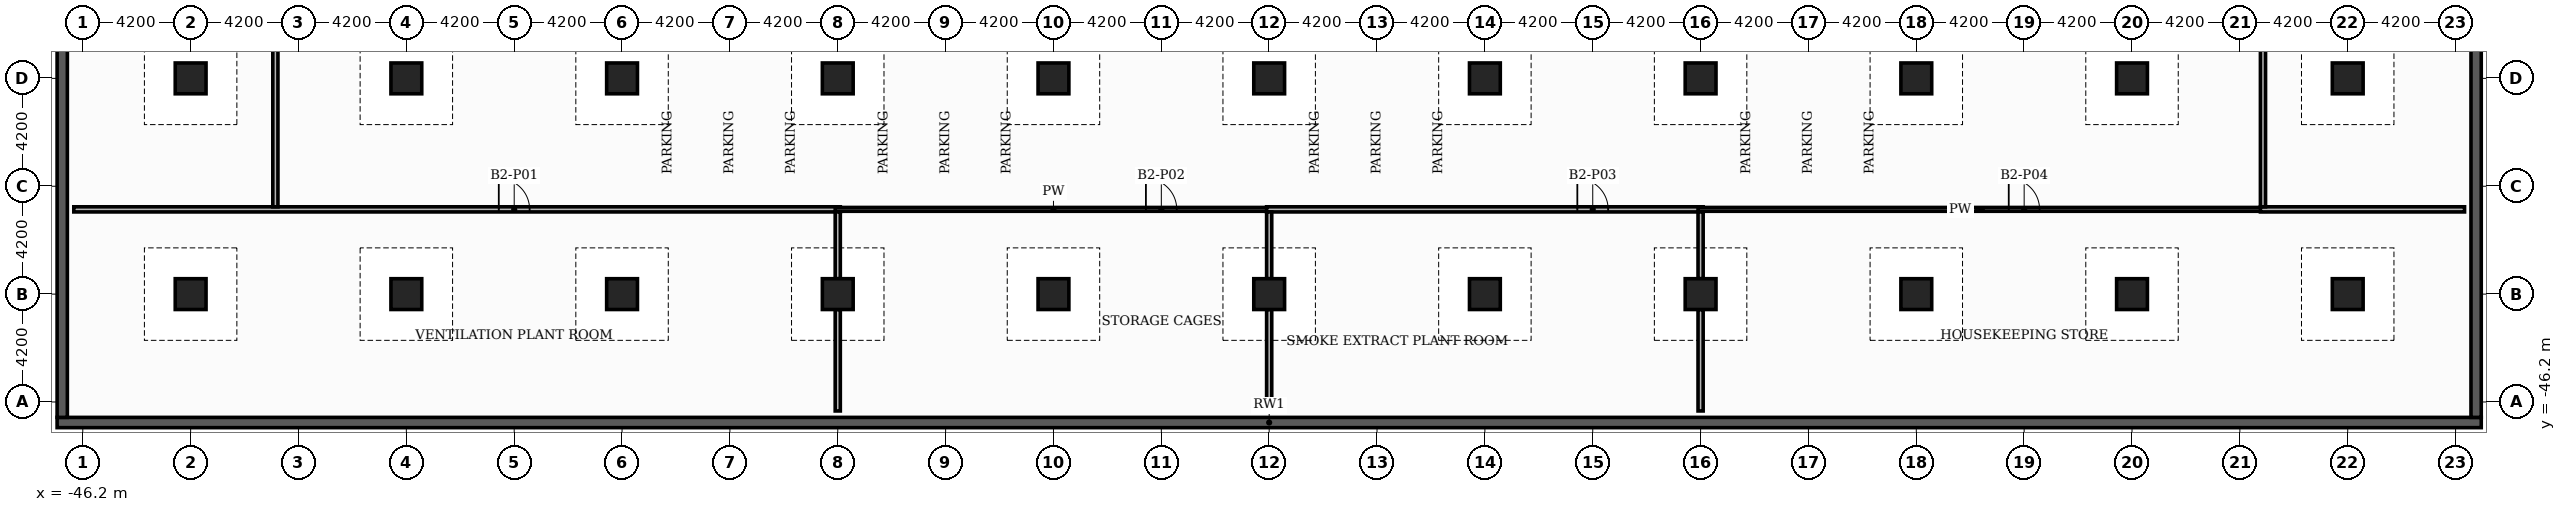
"""IFC4 building model, lengths in metres.
Left out: names, types, materials, properties, quantities, classifications, styles, units other than length and angle.
Written with IfcOpenShell. Run it as: python <this file> out.ifc"""

import sys

from ifc_helpers import new_model, si_unit, direction, frame, frame_2d, origin, origin_2d, place, context, subcontext, project, spatial, rectangle, extrude, element, fill, save


model = new_model("IFC4")
c1 = context("Model", 3, precision=1e-05, world=origin(), true_north=direction((0.0, 1.0)))
c2 = subcontext(c1, "Body", "Model", "MODEL_VIEW")
j1 = project(units=[si_unit("LENGTHUNIT", "METRE"), si_unit("PLANEANGLEUNIT", "RADIAN")], contexts=[c1])
p1 = place(None, origin())
s1 = spatial("IfcSite", under=j1, at=p1, CompositionType="ELEMENT")
p2 = place(p1, origin())
s2 = spatial("IfcBuilding", under=s1, at=p2, CompositionType="ELEMENT")
p3 = place(p2, frame((0.0, 0.0, -8.4)))
s3 = spatial("IfcBuildingStorey", under=s2, at=p3, CompositionType="ELEMENT", Elevation=-8.4)
p4 = place(p3, frame((-47.2, -47.0, -0.4), z_axis=(0.0, 0.0, 1.0), x_axis=(1.0, 0.0, 0.0)))
e1 = element("IfcWall", 1, at=p4, inside=s3, PredefinedType="USERDEFINED", context=c2, shape_type="SweptSolid", body=[
    extrude(rectangle(XDim=94.4, YDim=0.4, at=frame_2d((47.2, 0.0))), origin(), (0.0, 0.0, 1.0), 4.6),
])
for number, where, z_axis, x_axis in (
    (2, (-47.0, -46.8, -0.4), (0.0, 0.0, 1.0), (0.0, 1.0, 0.0)),
    (3, (47.0, -46.8, -0.4), (0.0, 0.0, 1.0), (0.0, 1.0, 0.0)),
):
    element("IfcWall", number, at=place(p3, frame(where, z_axis=z_axis, x_axis=x_axis)), inside=s3, PredefinedType="USERDEFINED", context=c2, shape_type="SweptSolid", body=[
        extrude(rectangle(XDim=93.6, YDim=0.4, at=frame_2d((46.8, 0.0))), origin(), (0.0, 0.0, 1.0), 4.6),
    ])
for number, where, z_axis, x_axis in (
    (4, (0.0, -33.6, 0.0), (0.0, 0.0, 1.0), (1.0, 0.0, 0.0)),
    (5, (0.0, -42.0, 0.0), (0.0, 0.0, 1.0), (1.0, 0.0, 0.0)),
    (6, (8.4, -33.6, 0.0), (0.0, 0.0, 1.0), (1.0, 0.0, 0.0)),
    (7, (8.4, -42.0, 0.0), (0.0, 0.0, 1.0), (1.0, 0.0, 0.0)),
    (8, (16.8, -33.6, 0.0), (0.0, 0.0, 1.0), (1.0, 0.0, 0.0)),
    (9, (16.8, -42.0, 0.0), (0.0, 0.0, 1.0), (1.0, 0.0, 0.0)),
    (10, (25.2, -33.6, 0.0), (0.0, 0.0, 1.0), (1.0, 0.0, 0.0)),
    (11, (25.2, -42.0, 0.0), (0.0, 0.0, 1.0), (1.0, 0.0, 0.0)),
    (12, (33.6, -33.6, 0.0), (0.0, 0.0, 1.0), (1.0, 0.0, 0.0)),
    (13, (33.6, -42.0, 0.0), (0.0, 0.0, 1.0), (1.0, 0.0, 0.0)),
    (14, (42.0, -33.6, 0.0), (0.0, 0.0, 1.0), (1.0, 0.0, 0.0)),
    (15, (42.0, -42.0, 0.0), (0.0, 0.0, 1.0), (1.0, 0.0, 0.0)),
    (16, (-8.4, -33.6, 0.0), (0.0, 0.0, 1.0), (1.0, 0.0, 0.0)),
    (17, (-8.4, -42.0, 0.0), (0.0, 0.0, 1.0), (1.0, 0.0, 0.0)),
    (18, (-16.8, -33.6, 0.0), (0.0, 0.0, 1.0), (1.0, 0.0, 0.0)),
    (19, (-16.8, -42.0, 0.0), (0.0, 0.0, 1.0), (1.0, 0.0, 0.0)),
    (20, (-25.2, -33.6, 0.0), (0.0, 0.0, 1.0), (1.0, 0.0, 0.0)),
    (21, (-25.2, -42.0, 0.0), (0.0, 0.0, 1.0), (1.0, 0.0, 0.0)),
    (22, (-33.6, -33.6, 0.0), (0.0, 0.0, 1.0), (1.0, 0.0, 0.0)),
    (23, (-33.6, -42.0, 0.0), (0.0, 0.0, 1.0), (1.0, 0.0, 0.0)),
    (24, (-42.0, -33.6, 0.0), (0.0, 0.0, 1.0), (1.0, 0.0, 0.0)),
    (25, (-42.0, -42.0, 0.0), (0.0, 0.0, 1.0), (1.0, 0.0, 0.0)),
):
    element("IfcColumn", number, at=place(p3, frame(where, z_axis=z_axis, x_axis=x_axis)), inside=s3, PredefinedType="COLUMN", context=c2, shape_type="SweptSolid", body=[
        extrude(rectangle(XDim=1.2, YDim=1.2, at=origin_2d()), origin(), (0.0, 0.0, 1.0), 4.2),
    ])
p5 = place(p3, frame((-46.55, -38.7, 0.0), z_axis=(0.0, 0.0, 1.0), x_axis=(1.0, 0.0, 0.0)))
e26 = element("IfcWall", 26, at=p5, inside=s3, PredefinedType="PARTITIONING", context=c2, shape_type="SweptSolid", body=[
    extrude(rectangle(XDim=29.85, YDim=0.2, at=frame_2d((14.925, 0.0))), origin(), (0.0, 0.0, 1.0), 3.85),
])
p6 = place(p5, frame((16.55, 0.0, 0.0)))
e27 = element("IfcOpeningElement", 27, at=p6, cuts=e26, PredefinedType="OPENING", context=c2, shape_type="SweptSolid", body=[
    extrude(rectangle(XDim=1.2, YDim=2.2, at=frame_2d((0.6, 1.1))), frame((0.0, 0.11, 0.0), z_axis=(0.0, -1.0, 0.0), x_axis=(1.0, 0.0, 0.0)), (0.0, 0.0, 1.0), 0.22),
])
p7 = place(p3, frame((-16.9, -38.7, 0.0), z_axis=(0.0, 0.0, 1.0), x_axis=(1.0, 0.0, 0.0)))
e28 = element("IfcWall", 28, at=p7, inside=s3, PredefinedType="PARTITIONING", context=c2, shape_type="SweptSolid", body=[
    extrude(rectangle(XDim=17.0, YDim=0.15, at=frame_2d((8.5, 0.0))), origin(), (0.0, 0.0, 1.0), 3.85),
])
p8 = place(p7, frame((12.1, 0.0, 0.0)))
e29 = element("IfcOpeningElement", 29, at=p8, cuts=e28, PredefinedType="OPENING", context=c2, shape_type="SweptSolid", body=[
    extrude(rectangle(XDim=1.2, YDim=2.2, at=frame_2d((0.6, 1.1))), frame((0.0, 0.085, 0.0), z_axis=(0.0, -1.0, 0.0), x_axis=(1.0, 0.0, 0.0)), (0.0, 0.0, 1.0), 0.17),
])
p9 = place(p3, frame((-0.1, -38.7, 0.0), z_axis=(0.0, 0.0, 1.0), x_axis=(1.0, 0.0, 0.0)))
e30 = element("IfcWall", 30, at=p9, inside=s3, PredefinedType="PARTITIONING", context=c2, shape_type="SweptSolid", body=[
    extrude(rectangle(XDim=17.0, YDim=0.2, at=frame_2d((8.5, 0.0))), origin(), (0.0, 0.0, 1.0), 3.85),
])
p10 = place(p9, frame((12.1, 0.0, 0.0)))
e31 = element("IfcOpeningElement", 31, at=p10, cuts=e30, PredefinedType="OPENING", context=c2, shape_type="SweptSolid", body=[
    extrude(rectangle(XDim=1.2, YDim=2.2, at=frame_2d((0.6, 1.1))), frame((0.0, 0.11, 0.0), z_axis=(0.0, -1.0, 0.0), x_axis=(1.0, 0.0, 0.0)), (0.0, 0.0, 1.0), 0.22),
])
p11 = place(p3, frame((16.7, -38.7, 0.0), z_axis=(0.0, 0.0, 1.0), x_axis=(1.0, 0.0, 0.0)))
e32 = element("IfcWall", 32, at=p11, inside=s3, PredefinedType="PARTITIONING", context=c2, shape_type="SweptSolid", body=[
    extrude(rectangle(XDim=22.1, YDim=0.15, at=frame_2d((11.05, 0.0))), origin(), (0.0, 0.0, 1.0), 3.85),
])
p12 = place(p11, frame((12.1, 0.0, 0.0)))
e33 = element("IfcOpeningElement", 33, at=p12, cuts=e32, PredefinedType="OPENING", context=c2, shape_type="SweptSolid", body=[
    extrude(rectangle(XDim=1.2, YDim=2.2, at=frame_2d((0.6, 1.1))), frame((0.0, 0.085, 0.0), z_axis=(0.0, -1.0, 0.0), x_axis=(1.0, 0.0, 0.0)), (0.0, 0.0, 1.0), 0.17),
])
p13 = place(p3, frame((38.6, -38.7, 0.0), z_axis=(0.0, 0.0, 1.0), x_axis=(1.0, 0.0, 0.0)))
e34 = element("IfcWall", 34, at=p13, inside=s3, PredefinedType="PARTITIONING", context=c2, shape_type="SweptSolid", body=[
    extrude(rectangle(XDim=7.95, YDim=0.2, at=frame_2d((3.975, 0.0))), origin(), (0.0, 0.0, 1.0), 3.85),
])
p14 = place(p3, frame((-38.7, -38.6, 0.0), z_axis=(0.0, 0.0, 1.0), x_axis=(0.0, 1.0, 0.0)))
e35 = element("IfcWall", 35, at=p14, inside=s3, PredefinedType="PARTITIONING", context=c2, shape_type="SweptSolid", body=[
    extrude(rectangle(XDim=72.1, YDim=0.2, at=frame_2d((36.05, 0.0))), origin(), (0.0, 0.0, 1.0), 3.85),
])
p15 = place(p14, frame((8.6, 0.0, 0.0)))
e36 = element("IfcOpeningElement", 36, at=p15, cuts=e35, PredefinedType="OPENING", context=c2, shape_type="SweptSolid", body=[
    extrude(rectangle(XDim=1.2, YDim=2.2, at=frame_2d((0.6, 1.1))), frame((0.0, 0.11, 0.0), z_axis=(0.0, -1.0, 0.0), x_axis=(1.0, 0.0, 0.0)), (0.0, 0.0, 1.0), 0.22),
])
p16 = place(p14, frame((33.8, 0.0, 0.0)))
e37 = element("IfcOpeningElement", 37, at=p16, cuts=e35, PredefinedType="OPENING", context=c2, shape_type="SweptSolid", body=[
    extrude(rectangle(XDim=1.2, YDim=2.2, at=frame_2d((0.6, 1.1))), frame((0.0, 0.11, 0.0), z_axis=(0.0, -1.0, 0.0), x_axis=(1.0, 0.0, 0.0)), (0.0, 0.0, 1.0), 0.22),
])
p17 = place(p14, frame((50.6, 0.0, 0.0)))
e38 = element("IfcOpeningElement", 38, at=p17, cuts=e35, PredefinedType="OPENING", context=c2, shape_type="SweptSolid", body=[
    extrude(rectangle(XDim=1.2, YDim=2.2, at=frame_2d((0.6, 1.1))), frame((0.0, 0.11, 0.0), z_axis=(0.0, -1.0, 0.0), x_axis=(1.0, 0.0, 0.0)), (0.0, 0.0, 1.0), 0.22),
])
p18 = place(p14, frame((67.4, 0.0, 0.0)))
e39 = element("IfcOpeningElement", 39, at=p18, cuts=e35, PredefinedType="OPENING", context=c2, shape_type="SweptSolid", body=[
    extrude(rectangle(XDim=1.2, YDim=2.2, at=frame_2d((0.6, 1.1))), frame((0.0, 0.11, 0.0), z_axis=(0.0, -1.0, 0.0), x_axis=(1.0, 0.0, 0.0)), (0.0, 0.0, 1.0), 0.22),
])
p19 = place(p3, frame((-16.8, -46.55, 0.0), z_axis=(0.0, 0.0, 1.0), x_axis=(0.0, 1.0, 0.0)))
e40 = element("IfcWall", 40, at=p19, inside=s3, PredefinedType="PARTITIONING", context=c2, shape_type="SweptSolid", body=[
    extrude(rectangle(XDim=3.95, YDim=0.2, at=frame_2d((1.975, 0.0))), origin(), (0.0, 0.0, 1.0), 3.85),
])
p20 = place(p3, frame((-16.8, -41.4, 0.0), z_axis=(0.0, 0.0, 1.0), x_axis=(0.0, 1.0, 0.0)))
e41 = element("IfcWall", 41, at=p20, inside=s3, PredefinedType="PARTITIONING", context=c2, shape_type="SweptSolid", body=[
    extrude(rectangle(XDim=2.6, YDim=0.2, at=frame_2d((1.3, 0.0))), origin(), (0.0, 0.0, 1.0), 3.85),
])
p21 = place(p3, frame((0.0, -46.55, 0.0), z_axis=(0.0, 0.0, 1.0), x_axis=(0.0, 1.0, 0.0)))
e42 = element("IfcWall", 42, at=p21, inside=s3, PredefinedType="PARTITIONING", context=c2, shape_type="SweptSolid", body=[
    extrude(rectangle(XDim=3.95, YDim=0.2, at=frame_2d((1.975, 0.0))), origin(), (0.0, 0.0, 1.0), 3.85),
])
p22 = place(p3, frame((0.0, -41.4, 0.0), z_axis=(0.0, 0.0, 1.0), x_axis=(0.0, 1.0, 0.0)))
e43 = element("IfcWall", 43, at=p22, inside=s3, PredefinedType="PARTITIONING", context=c2, shape_type="SweptSolid", body=[
    extrude(rectangle(XDim=2.6, YDim=0.2, at=frame_2d((1.3, 0.0))), origin(), (0.0, 0.0, 1.0), 3.85),
])
p23 = place(p3, frame((16.8, -46.55, 0.0), z_axis=(0.0, 0.0, 1.0), x_axis=(0.0, 1.0, 0.0)))
e44 = element("IfcWall", 44, at=p23, inside=s3, PredefinedType="PARTITIONING", context=c2, shape_type="SweptSolid", body=[
    extrude(rectangle(XDim=3.95, YDim=0.2, at=frame_2d((1.975, 0.0))), origin(), (0.0, 0.0, 1.0), 3.85),
])
p24 = place(p3, frame((16.8, -41.4, 0.0), z_axis=(0.0, 0.0, 1.0), x_axis=(0.0, 1.0, 0.0)))
e45 = element("IfcWall", 45, at=p24, inside=s3, PredefinedType="PARTITIONING", context=c2, shape_type="SweptSolid", body=[
    extrude(rectangle(XDim=2.6, YDim=0.2, at=frame_2d((1.3, 0.0))), origin(), (0.0, 0.0, 1.0), 3.85),
])
p25 = place(p3, frame((38.7, -38.6, 0.0), z_axis=(0.0, 0.0, 1.0), x_axis=(0.0, 1.0, 0.0)))
e46 = element("IfcWall", 46, at=p25, inside=s3, PredefinedType="PARTITIONING", context=c2, shape_type="SweptSolid", body=[
    extrude(rectangle(XDim=55.3, YDim=0.2, at=frame_2d((27.65, 0.0))), origin(), (0.0, 0.0, 1.0), 3.85),
])
p26 = place(p25, frame((8.6, 0.0, 0.0)))
e47 = element("IfcOpeningElement", 47, at=p26, cuts=e46, PredefinedType="OPENING", context=c2, shape_type="SweptSolid", body=[
    extrude(rectangle(XDim=1.2, YDim=2.2, at=frame_2d((0.6, 1.1))), frame((0.0, 0.11, 0.0), z_axis=(0.0, -1.0, 0.0), x_axis=(1.0, 0.0, 0.0)), (0.0, 0.0, 1.0), 0.22),
])
p27 = place(p25, frame((33.8, 0.0, 0.0)))
e48 = element("IfcOpeningElement", 48, at=p27, cuts=e46, PredefinedType="OPENING", context=c2, shape_type="SweptSolid", body=[
    extrude(rectangle(XDim=1.2, YDim=2.2, at=frame_2d((0.6, 1.1))), frame((0.0, 0.11, 0.0), z_axis=(0.0, -1.0, 0.0), x_axis=(1.0, 0.0, 0.0)), (0.0, 0.0, 1.0), 0.22),
])
p28 = place(p25, frame((50.6, 0.0, 0.0)))
e49 = element("IfcOpeningElement", 49, at=p28, cuts=e46, PredefinedType="OPENING", context=c2, shape_type="SweptSolid", body=[
    extrude(rectangle(XDim=1.2, YDim=2.2, at=frame_2d((0.6, 1.1))), frame((0.0, 0.11, 0.0), z_axis=(0.0, -1.0, 0.0), x_axis=(1.0, 0.0, 0.0)), (0.0, 0.0, 1.0), 0.22),
])
p29 = place(p6, origin())
e50 = element("IfcDoor", 50, at=p29, inside=s3, OperationType="SINGLE_SWING_LEFT", PredefinedType="DOOR", context=c2, shape_type="SweptSolid", body=[
    extrude(rectangle(XDim=1.2, YDim=2.2, at=frame_2d((0.6, 1.1))), frame((0.0, 0.025, 0.0), z_axis=(0.0, -1.0, 0.0), x_axis=(1.0, 0.0, 0.0)), (0.0, 0.0, 1.0), 0.05),
])
fill(e27, e50)
p30 = place(p8, origin())
e51 = element("IfcDoor", 51, at=p30, inside=s3, OperationType="SINGLE_SWING_LEFT", PredefinedType="DOOR", context=c2, shape_type="SweptSolid", body=[
    extrude(rectangle(XDim=1.2, YDim=2.2, at=frame_2d((0.6, 1.1))), frame((0.0, 0.025, 0.0), z_axis=(0.0, -1.0, 0.0), x_axis=(1.0, 0.0, 0.0)), (0.0, 0.0, 1.0), 0.05),
])
fill(e29, e51)
p31 = place(p10, origin())
e52 = element("IfcDoor", 52, at=p31, inside=s3, OperationType="SINGLE_SWING_LEFT", PredefinedType="DOOR", context=c2, shape_type="SweptSolid", body=[
    extrude(rectangle(XDim=1.2, YDim=2.2, at=frame_2d((0.6, 1.1))), frame((0.0, 0.025, 0.0), z_axis=(0.0, -1.0, 0.0), x_axis=(1.0, 0.0, 0.0)), (0.0, 0.0, 1.0), 0.05),
])
fill(e31, e52)
p32 = place(p12, origin())
e53 = element("IfcDoor", 53, at=p32, inside=s3, OperationType="SINGLE_SWING_LEFT", PredefinedType="DOOR", context=c2, shape_type="SweptSolid", body=[
    extrude(rectangle(XDim=1.2, YDim=2.2, at=frame_2d((0.6, 1.1))), frame((0.0, 0.025, 0.0), z_axis=(0.0, -1.0, 0.0), x_axis=(1.0, 0.0, 0.0)), (0.0, 0.0, 1.0), 0.05),
])
fill(e33, e53)
save(model, sys.argv[1])
